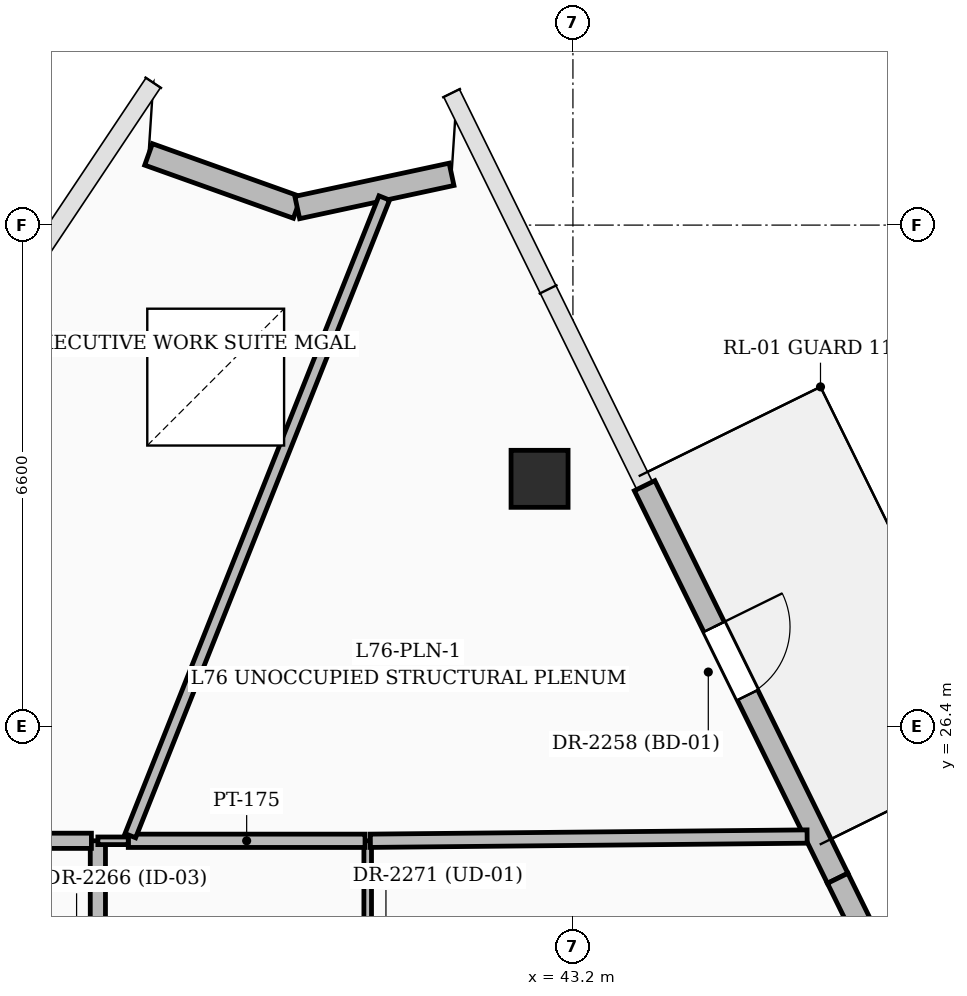
"""IFC4 building model, lengths in metres.
Left out: names, types, materials, properties, quantities, classifications, styles, units other than length and angle.
Written with IfcOpenShell. Run it as: python <this file> out.ifc"""

import sys

from ifc_helpers import new_model, si_unit, direction, frame, frame_2d, origin, origin_2d, place, context, subcontext, project, spatial, rectangle, extrude, element, fill, save


model = new_model("IFC4")
c1 = context("Model", 3, precision=1e-05, world=origin(), true_north=direction((0.0, 1.0)))
c2 = subcontext(c1, "Body", "Model", "MODEL_VIEW")
j1 = project(units=[si_unit("LENGTHUNIT", "METRE"), si_unit("PLANEANGLEUNIT", "RADIAN")], contexts=[c1])
p1 = place(None, origin())
s1 = spatial("IfcSite", under=j1, at=p1, CompositionType="ELEMENT")
p2 = place(p1, origin())
s2 = spatial("IfcBuilding", under=s1, at=p2, CompositionType="ELEMENT")
p3 = place(p2, frame((0.0, 0.0, 294.0)))
s3 = spatial("IfcBuildingStorey", under=s2, at=p3, CompositionType="ELEMENT", Elevation=294.0)
p4 = place(p3, frame((42.761, 29.662, 0.0), z_axis=(0.0, 0.0, 1.0), x_axis=(1.0, 0.0, 0.0)))
e1 = element("IfcColumn", 1, at=p4, inside=s3, PredefinedType="COLUMN", context=c2, shape_type="SweptSolid", body=[
    extrude(rectangle(XDim=0.75, YDim=0.75, at=origin_2d()), origin(), (0.0, 0.0, 1.0), 4.5),
])
p5 = place(p3, frame((37.617, 33.93, 0.0), z_axis=(0.0, 0.0, 1.0), x_axis=(0.941683396202, -0.336500195123, 0.0)))
e2 = element("IfcWall", 2, at=p5, inside=s3, PredefinedType="SOLIDWALL", context=c2, shape_type="SweptSolid", body=[
    extrude(rectangle(XDim=2.077, YDim=0.3, at=frame_2d((1.039, 0.0))), origin(), (0.0, 0.0, 1.0), 4.2),
])
p6 = place(p3, frame((39.573, 33.231, 0.0), z_axis=(0.0, 0.0, 1.0), x_axis=(0.977604114456, 0.210452358975, 0.0)))
e3 = element("IfcWall", 3, at=p6, inside=s3, PredefinedType="SOLIDWALL", context=c2, shape_type="SweptSolid", body=[
    extrude(rectangle(XDim=2.076, YDim=0.3, at=frame_2d((1.038, 0.0))), origin(), (0.0, 0.0, 1.0), 4.2),
])
p7 = place(p3, frame((44.143, 29.572, 0.0), z_axis=(0.0, 0.0, 1.0), x_axis=(0.441265341282, -0.897376675975, 0.0)))
e4 = element("IfcWall", 4, at=p7, inside=s3, PredefinedType="SOLIDWALL", context=c2, shape_type="SweptSolid", body=[
    extrude(rectangle(XDim=5.756, YDim=0.3, at=frame_2d((2.878, 0.0))), origin(), (0.0, 0.0, 1.0), 4.2),
])
p8 = place(p7, frame((2.07, 0.0, 0.0)))
e5 = element("IfcOpeningElement", 5, at=p8, cuts=e4, PredefinedType="OPENING", context=c2, shape_type="SweptSolid", body=[
    extrude(rectangle(XDim=1.0, YDim=2.2, at=frame_2d((0.5, 1.1))), frame((0.0, 0.16, 0.0), z_axis=(0.0, -1.0, 0.0), x_axis=(1.0, 0.0, 0.0)), (0.0, 0.0, 1.0), 0.32),
])
p9 = place(p3, frame((46.683, 24.406, 0.0), z_axis=(0.0, 0.0, 1.0), x_axis=(0.441299498192, -0.897359879254, 0.0)))
e6 = element("IfcWall", 6, at=p9, inside=s3, PredefinedType="SOLIDWALL", context=c2, shape_type="SweptSolid", body=[
    extrude(rectangle(XDim=5.756, YDim=0.3, at=frame_2d((2.878, 0.0))), origin(), (0.0, 0.0, 1.0), 4.2),
])
p10 = place(p9, frame((0.9, 0.0, 0.6)))
e7 = element("IfcOpeningElement", 7, at=p10, cuts=e6, PredefinedType="OPENING", context=c2, shape_type="SweptSolid", body=[
    extrude(rectangle(XDim=1.5, YDim=2.1, at=frame_2d((0.75, 1.05))), frame((0.0, 0.16, 0.0), z_axis=(0.0, -1.0, 0.0), x_axis=(1.0, 0.0, 0.0)), (0.0, 0.0, 1.0), 0.32),
])
p11 = place(p3, frame((40.5, 21.56, 0.0), z_axis=(0.0, 0.0, 1.0), x_axis=(0.0, 1.0, 0.0)))
e8 = element("IfcWall", 8, at=p11, inside=s3, PredefinedType="PARTITIONING", context=c2, shape_type="SweptSolid", body=[
    extrude(rectangle(XDim=3.34, YDim=0.1, at=frame_2d((1.67, 0.0))), origin(), (0.0, 0.0, 1.0), 3.535),
])
p12 = place(p11, frame((1.222, 0.0, 0.0)))
e9 = element("IfcOpeningElement", 9, at=p12, cuts=e8, PredefinedType="OPENING", context=c2, shape_type="SweptSolid", body=[
    extrude(rectangle(XDim=0.95, YDim=2.2, at=frame_2d((0.475, 1.1))), frame((0.0, 0.06, 0.0), z_axis=(0.0, -1.0, 0.0), x_axis=(1.0, 0.0, 0.0)), (0.0, 0.0, 1.0), 0.12),
])
p13 = place(p3, frame((40.465, 24.9, 0.0), z_axis=(0.0, 0.0, 1.0), x_axis=(-1.0, 0.0, 0.0)))
e10 = element("IfcWall", 10, at=p13, inside=s3, PredefinedType="PARTITIONING", context=c2, shape_type="SweptSolid", body=[
    extrude(rectangle(XDim=3.115, YDim=0.175, at=frame_2d((1.558, 0.0))), origin(), (0.0, 0.0, 1.0), 3.535),
])
p14 = place(p3, frame((36.95, 24.9, 0.0), z_axis=(0.0, 0.0, 1.0), x_axis=(0.0, -1.0, 0.0)))
e11 = element("IfcWall", 11, at=p14, inside=s3, PredefinedType="PARTITIONING", context=c2, shape_type="SweptSolid", body=[
    extrude(rectangle(XDim=3.34, YDim=0.2, at=frame_2d((1.67, 0.0))), origin(), (0.0, 0.0, 1.0), 3.559),
])
p15 = place(p14, frame((1.192, 0.0, 0.0)))
e12 = element("IfcOpeningElement", 12, at=p15, cuts=e11, PredefinedType="OPENING", context=c2, shape_type="SweptSolid", body=[
    extrude(rectangle(XDim=0.9, YDim=2.1, at=frame_2d((0.45, 1.05))), frame((0.0, 0.11, 0.0), z_axis=(0.0, -1.0, 0.0), x_axis=(1.0, 0.0, 0.0)), (0.0, 0.0, 1.0), 0.22),
])
p16 = place(p3, frame((37.35, 24.9, 0.0), z_axis=(0.0, 0.0, 1.0), x_axis=(-1.0, 0.0, 0.0)))
e13 = element("IfcWall", 13, at=p16, inside=s3, PredefinedType="PARTITIONING", context=c2, shape_type="SweptSolid", body=[
    extrude(rectangle(XDim=0.4, YDim=0.1, at=frame_2d((0.2, 0.0))), origin(), (0.0, 0.0, 1.0), 4.2),
])
p17 = place(p3, frame((46.281, 24.956, 0.0), z_axis=(0.0, 0.0, 1.0), x_axis=(-0.999952669093, -0.009729315144, 0.0)))
e14 = element("IfcWall", 14, at=p17, inside=s3, PredefinedType="PARTITIONING", context=c2, shape_type="SweptSolid", body=[
    extrude(rectangle(XDim=5.746, YDim=0.175, at=frame_2d((2.873, 0.0))), origin(), (0.0, 0.0, 1.0), 3.477),
])
p18 = place(p3, frame((40.718, 33.357, 0.0), z_axis=(0.0, 0.0, 1.0), x_axis=(-0.369977886049, -0.92904056092, 0.0)))
e15 = element("IfcWall", 15, at=p18, inside=s3, PredefinedType="PARTITIONING", context=c2, shape_type="SweptSolid", body=[
    extrude(rectangle(XDim=9.031, YDim=0.15, at=frame_2d((4.515, 0.0))), origin(), (0.0, 0.0, 1.0), 3.477),
])
p19 = place(p3, frame((36.865, 24.9, 0.0), z_axis=(0.0, 0.0, 1.0), x_axis=(-1.0, 0.0, 0.0)))
e16 = element("IfcWall", 16, at=p19, inside=s3, PredefinedType="PARTITIONING", context=c2, shape_type="SweptSolid", body=[
    extrude(rectangle(XDim=2.215, YDim=0.2, at=frame_2d((1.107, 0.0))), origin(), (0.0, 0.0, 1.0), 3.535),
])
p20 = place(p8, origin())
e17 = element("IfcDoor", 17, at=p20, inside=s3, OperationType="SINGLE_SWING_LEFT", PredefinedType="DOOR", context=c2, shape_type="SweptSolid", body=[
    extrude(rectangle(XDim=1.0, YDim=2.2, at=frame_2d((0.5, 1.1))), frame((0.0, 0.025, 0.0), z_axis=(0.0, -1.0, 0.0), x_axis=(1.0, 0.0, 0.0)), (0.0, 0.0, 1.0), 0.05),
])
fill(e5, e17)
p21 = place(p3, frame((0.0, 0.0, -0.3)))
p22 = place(p21, frame((38.5, 31.0, 0.0)))
p23 = place(p22, frame((0.0, 0.0, 0.25)))
e18 = element("IfcWindow", 18, at=p23, inside=s3, PartitioningType="SINGLE_PANEL", PredefinedType="SKYLIGHT", context=c2, shape_type="SweptSolid", body=[
    extrude(rectangle(XDim=1.8, YDim=1.8, at=origin_2d()), origin(), (0.0, 0.0, 1.0), 0.05),
])
save(model, sys.argv[1])
